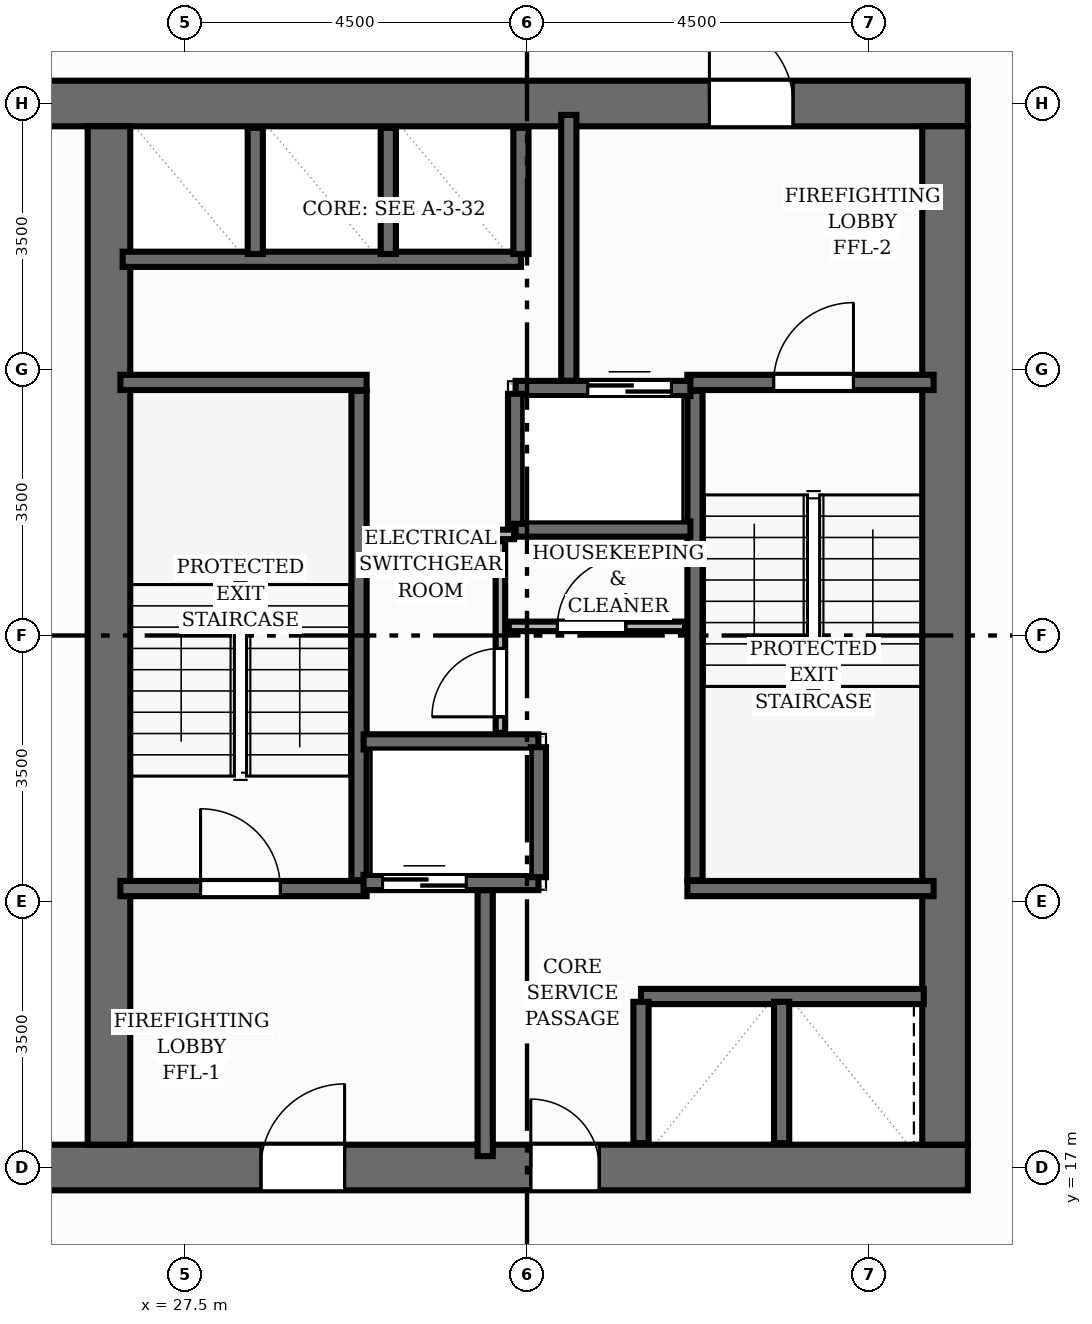
"""IFC4 building model, lengths in metres.
Left out: names, types, materials, properties, quantities, classifications, styles, units other than length and angle.
Written with IfcOpenShell. Run it as: python <this file> out.ifc"""

import sys

from ifc_helpers import new_model, si_unit, direction, frame, frame_2d, origin, place, context, subcontext, project, spatial, rectangle, extrude, element, fill, save


model = new_model("IFC4")
c1 = context("Model", 3, precision=1e-05, world=origin(), true_north=direction((0.0, 1.0)))
c2 = subcontext(c1, "Body", "Model", "MODEL_VIEW")
j1 = project(units=[si_unit("LENGTHUNIT", "METRE"), si_unit("PLANEANGLEUNIT", "RADIAN")], contexts=[c1])
p1 = place(None, origin())
s1 = spatial("IfcSite", under=j1, at=p1, CompositionType="ELEMENT")
p2 = place(p1, origin())
s2 = spatial("IfcBuilding", under=s1, at=p2, CompositionType="ELEMENT")
p3 = place(p2, frame((0.0, 0.0, 129.76)))
s3 = spatial("IfcBuildingStorey", under=s2, at=p3, CompositionType="ELEMENT", Elevation=129.76)
p4 = place(p3, frame((22.7, 17.0, 0.0), z_axis=(0.0, 0.0, 1.0), x_axis=(1.0, 0.0, 0.0)))
e1 = element("IfcWall", 1, at=p4, inside=s3, PredefinedType="SHEAR", context=c2, shape_type="SweptSolid", body=[
    extrude(rectangle(XDim=15.1, YDim=0.6, at=frame_2d((7.55, 0.0))), origin(), (0.0, 0.0, 1.0), 3.2),
])
p5 = place(p4, frame((5.8, 0.0, 0.0)))
e2 = element("IfcOpeningElement", 2, at=p5, cuts=e1, PredefinedType="OPENING", context=c2, shape_type="SweptSolid", body=[
    extrude(rectangle(XDim=1.1, YDim=2.15, at=frame_2d((0.55, 1.075))), frame((0.0, 0.31, 0.0), z_axis=(0.0, -1.0, 0.0), x_axis=(1.0, 0.0, 0.0)), (0.0, 0.0, 1.0), 0.62),
])
p6 = place(p4, frame((9.35, 0.0, 0.0)))
e3 = element("IfcOpeningElement", 3, at=p6, cuts=e1, PredefinedType="OPENING", context=c2, shape_type="SweptSolid", body=[
    extrude(rectangle(XDim=0.9, YDim=2.1, at=frame_2d((0.45, 1.05))), frame((0.0, 0.31, 0.0), z_axis=(0.0, -1.0, 0.0), x_axis=(1.0, 0.0, 0.0)), (0.0, 0.0, 1.0), 0.62),
])
p7 = place(p3, frame((22.7, 31.0, 0.0), z_axis=(0.0, 0.0, 1.0), x_axis=(1.0, 0.0, 0.0)))
e4 = element("IfcWall", 4, at=p7, inside=s3, PredefinedType="SHEAR", context=c2, shape_type="SweptSolid", body=[
    extrude(rectangle(XDim=15.1, YDim=0.6, at=frame_2d((7.55, 0.0))), origin(), (0.0, 0.0, 1.0), 3.2),
])
p8 = place(p7, frame((11.7, 0.0, 0.0)))
e5 = element("IfcOpeningElement", 5, at=p8, cuts=e4, PredefinedType="OPENING", context=c2, shape_type="SweptSolid", body=[
    extrude(rectangle(XDim=1.1, YDim=2.15, at=frame_2d((0.55, 1.075))), frame((0.0, 0.31, 0.0), z_axis=(0.0, -1.0, 0.0), x_axis=(1.0, 0.0, 0.0)), (0.0, 0.0, 1.0), 0.62),
])
p9 = place(p3, frame((37.5, 17.3, 0.0), z_axis=(0.0, 0.0, 1.0), x_axis=(0.0, 1.0, 0.0)))
e6 = element("IfcWall", 6, at=p9, inside=s3, PredefinedType="SHEAR", context=c2, shape_type="SweptSolid", body=[
    extrude(rectangle(XDim=13.4, YDim=0.6, at=frame_2d((6.7, 0.0))), origin(), (0.0, 0.0, 1.0), 3.2),
])
p10 = place(p3, frame((26.5, 17.3, 0.0), z_axis=(0.0, 0.0, 1.0), x_axis=(0.0, 1.0, 0.0)))
e7 = element("IfcWall", 7, at=p10, inside=s3, PredefinedType="SHEAR", context=c2, shape_type="SweptSolid", body=[
    extrude(rectangle(XDim=13.4, YDim=0.56, at=frame_2d((6.7, 0.0))), origin(), (0.0, 0.0, 1.0), 3.2),
])
p11 = place(p3, frame((29.79, 20.78, 0.0), z_axis=(0.0, 0.0, 1.0), x_axis=(0.0, 1.0, 0.0)))
e8 = element("IfcWall", 8, at=p11, inside=s3, PredefinedType="SHEAR", context=c2, shape_type="SweptSolid", body=[
    extrude(rectangle(XDim=6.44, YDim=0.2, at=frame_2d((3.22, 0.0))), origin(), (0.0, 0.0, 1.0), 3.2),
])
p12 = place(p3, frame((26.65, 27.33, 0.0), z_axis=(0.0, 0.0, 1.0), x_axis=(1.0, 0.0, 0.0)))
e9 = element("IfcWall", 9, at=p12, inside=s3, PredefinedType="SHEAR", context=c2, shape_type="SweptSolid", body=[
    extrude(rectangle(XDim=3.24, YDim=0.2, at=frame_2d((1.62, 0.0))), origin(), (0.0, 0.0, 1.0), 3.2),
])
p13 = place(p3, frame((26.65, 20.67, 0.0), z_axis=(0.0, 0.0, 1.0), x_axis=(1.0, 0.0, 0.0)))
e10 = element("IfcWall", 10, at=p13, inside=s3, PredefinedType="SHEAR", context=c2, shape_type="SweptSolid", body=[
    extrude(rectangle(XDim=3.24, YDim=0.2, at=frame_2d((1.62, 0.0))), origin(), (0.0, 0.0, 1.0), 3.2),
])
p14 = place(p13, frame((1.055, 0.0, 0.0)))
e11 = element("IfcOpeningElement", 11, at=p14, cuts=e10, PredefinedType="OPENING", context=c2, shape_type="SweptSolid", body=[
    extrude(rectangle(XDim=1.05, YDim=2.15, at=frame_2d((0.525, 1.075))), frame((0.0, 0.11, 0.0), z_axis=(0.0, -1.0, 0.0), x_axis=(1.0, 0.0, 0.0)), (0.0, 0.0, 1.0), 0.22),
])
p15 = place(p3, frame((34.21, 20.78, 0.0), z_axis=(0.0, 0.0, 1.0), x_axis=(0.0, 1.0, 0.0)))
e12 = element("IfcWall", 12, at=p15, inside=s3, PredefinedType="SHEAR", context=c2, shape_type="SweptSolid", body=[
    extrude(rectangle(XDim=6.44, YDim=0.2, at=frame_2d((3.22, 0.0))), origin(), (0.0, 0.0, 1.0), 3.2),
])
p16 = place(p3, frame((34.11, 20.67, 0.0), z_axis=(0.0, 0.0, 1.0), x_axis=(1.0, 0.0, 0.0)))
e13 = element("IfcWall", 13, at=p16, inside=s3, PredefinedType="SHEAR", context=c2, shape_type="SweptSolid", body=[
    extrude(rectangle(XDim=3.24, YDim=0.2, at=frame_2d((1.62, 0.0))), origin(), (0.0, 0.0, 1.0), 3.2),
])
p17 = place(p3, frame((34.11, 27.33, 0.0), z_axis=(0.0, 0.0, 1.0), x_axis=(1.0, 0.0, 0.0)))
e14 = element("IfcWall", 14, at=p17, inside=s3, PredefinedType="SHEAR", context=c2, shape_type="SweptSolid", body=[
    extrude(rectangle(XDim=3.24, YDim=0.2, at=frame_2d((1.62, 0.0))), origin(), (0.0, 0.0, 1.0), 3.2),
])
p18 = place(p17, frame((1.135, 0.0, 0.0)))
e15 = element("IfcOpeningElement", 15, at=p18, cuts=e14, PredefinedType="OPENING", context=c2, shape_type="SweptSolid", body=[
    extrude(rectangle(XDim=1.05, YDim=2.15, at=frame_2d((0.525, 1.075))), frame((0.0, 0.11, 0.0), z_axis=(0.0, -1.0, 0.0), x_axis=(1.0, 0.0, 0.0)), (0.0, 0.0, 1.0), 0.22),
])
for number, where, z_axis, x_axis in (
    (16, (31.45, 17.15, 0.0), (0.0, 0.0, 1.0), (0.0, 1.0, 0.0)),
    (17, (32.55, 27.35, 0.0), (0.0, 0.0, 1.0), (0.0, 1.0, 0.0)),
):
    element("IfcWall", number, at=place(p3, frame(where, z_axis=z_axis, x_axis=x_axis)), inside=s3, PredefinedType="SHEAR", context=c2, shape_type="SweptSolid", body=[
        extrude(rectangle(XDim=3.5, YDim=0.2, at=frame_2d((1.75, 0.0))), origin(), (0.0, 0.0, 1.0), 3.2),
    ])
p19 = place(p3, frame((29.85, 20.75, 0.0), z_axis=(0.0, 0.0, 1.0), x_axis=(1.0, 0.0, 0.0)))
e18 = element("IfcWall", 18, at=p19, inside=s3, PredefinedType="SHEAR", context=c2, shape_type="SweptSolid", body=[
    extrude(rectangle(XDim=2.3, YDim=0.2, at=frame_2d((1.15, 0.0))), origin(), (0.0, 0.0, 1.0), 3.2),
])
p20 = place(p19, frame((0.25, 0.0, 0.0)))
e19 = element("IfcOpeningElement", 19, at=p20, cuts=e18, PredefinedType="OPENING", context=c2, shape_type="SweptSolid", body=[
    extrude(rectangle(XDim=1.1, YDim=2.15, at=frame_2d((0.55, 1.075))), frame((0.0, 0.11, 0.0), z_axis=(0.0, -1.0, 0.0), x_axis=(1.0, 0.0, 0.0)), (0.0, 0.0, 1.0), 0.22),
])
p21 = place(p3, frame((29.85, 22.6, 0.0), z_axis=(0.0, 0.0, 1.0), x_axis=(1.0, 0.0, 0.0)))
e20 = element("IfcWall", 20, at=p21, inside=s3, PredefinedType="SHEAR", context=c2, shape_type="SweptSolid", body=[
    extrude(rectangle(XDim=2.3, YDim=0.2, at=frame_2d((1.15, 0.0))), origin(), (0.0, 0.0, 1.0), 3.2),
])
p22 = place(p3, frame((32.15, 20.82, 0.0), z_axis=(0.0, 0.0, 1.0), x_axis=(0.0, 1.0, 0.0)))
e21 = element("IfcWall", 21, at=p22, inside=s3, PredefinedType="SHEAR", context=c2, shape_type="SweptSolid", body=[
    extrude(rectangle(XDim=1.71, YDim=0.2, at=frame_2d((0.855, 0.0))), origin(), (0.0, 0.0, 1.0), 3.2),
])
p23 = place(p3, frame((31.85, 27.25, 0.0), z_axis=(0.0, 0.0, 1.0), x_axis=(1.0, 0.0, 0.0)))
e22 = element("IfcWall", 22, at=p23, inside=s3, PredefinedType="SHEAR", context=c2, shape_type="SweptSolid", body=[
    extrude(rectangle(XDim=2.3, YDim=0.2, at=frame_2d((1.15, 0.0))), origin(), (0.0, 0.0, 1.0), 3.2),
])
p24 = place(p23, frame((0.95, 0.0, 0.0)))
e23 = element("IfcOpeningElement", 23, at=p24, cuts=e22, PredefinedType="OPENING", context=c2, shape_type="SweptSolid", body=[
    extrude(rectangle(XDim=1.1, YDim=2.15, at=frame_2d((0.55, 1.075))), frame((0.0, 0.11, 0.0), z_axis=(0.0, -1.0, 0.0), x_axis=(1.0, 0.0, 0.0)), (0.0, 0.0, 1.0), 0.22),
])
p25 = place(p3, frame((31.85, 25.4, 0.0), z_axis=(0.0, 0.0, 1.0), x_axis=(1.0, 0.0, 0.0)))
e24 = element("IfcWall", 24, at=p25, inside=s3, PredefinedType="SHEAR", context=c2, shape_type="SweptSolid", body=[
    extrude(rectangle(XDim=2.3, YDim=0.2, at=frame_2d((1.15, 0.0))), origin(), (0.0, 0.0, 1.0), 3.2),
])
p26 = place(p3, frame((31.85, 25.47, 0.0), z_axis=(0.0, 0.0, 1.0), x_axis=(0.0, 1.0, 0.0)))
e25 = element("IfcWall", 25, at=p26, inside=s3, PredefinedType="SHEAR", context=c2, shape_type="SweptSolid", body=[
    extrude(rectangle(XDim=1.71, YDim=0.2, at=frame_2d((0.855, 0.0))), origin(), (0.0, 0.0, 1.0), 3.2),
])
p27 = place(p3, frame((26.68, 28.95, 0.0), z_axis=(0.0, 0.0, 1.0), x_axis=(1.0, 0.0, 0.0)))
e26 = element("IfcWall", 26, at=p27, inside=s3, PredefinedType="SHEAR", context=c2, shape_type="SweptSolid", body=[
    extrude(rectangle(XDim=5.24, YDim=0.2, at=frame_2d((2.62, 0.0))), origin(), (0.0, 0.0, 1.0), 3.2),
])
for number, where, z_axis, x_axis in (
    (27, (31.92, 29.02, 0.0), (0.0, 0.0, 1.0), (0.0, 1.0, 0.0)),
    (28, (28.425, 29.02, 0.0), (0.0, 0.0, 1.0), (0.0, 1.0, 0.0)),
    (29, (30.175, 29.02, 0.0), (0.0, 0.0, 1.0), (0.0, 1.0, 0.0)),
):
    element("IfcWall", number, at=place(p3, frame(where, z_axis=z_axis, x_axis=x_axis)), inside=s3, PredefinedType="SHEAR", context=c2, shape_type="SweptSolid", body=[
        extrude(rectangle(XDim=1.66, YDim=0.2, at=frame_2d((0.83, 0.0))), origin(), (0.0, 0.0, 1.0), 3.2),
    ])
p28 = place(p3, frame((33.5, 19.25, 0.0), z_axis=(0.0, 0.0, 1.0), x_axis=(1.0, 0.0, 0.0)))
e30 = element("IfcWall", 30, at=p28, inside=s3, PredefinedType="SHEAR", context=c2, shape_type="SweptSolid", body=[
    extrude(rectangle(XDim=3.72, YDim=0.2, at=frame_2d((1.86, 0.0))), origin(), (0.0, 0.0, 1.0), 3.2),
])
for number, where, z_axis, x_axis in (
    (31, (33.5, 17.32, 0.0), (0.0, 0.0, 1.0), (0.0, 1.0, 0.0)),
    (32, (35.35, 17.32, 0.0), (0.0, 0.0, 1.0), (0.0, 1.0, 0.0)),
):
    element("IfcWall", number, at=place(p3, frame(where, z_axis=z_axis, x_axis=x_axis)), inside=s3, PredefinedType="SHEAR", context=c2, shape_type="SweptSolid", body=[
        extrude(rectangle(XDim=1.86, YDim=0.2, at=frame_2d((0.93, 0.0))), origin(), (0.0, 0.0, 1.0), 3.2),
    ])
p29 = place(p3, frame((31.65, 22.72, 0.0), z_axis=(0.0, 0.0, 1.0), x_axis=(0.0, 1.0, 0.0)))
e33 = element("IfcWall", 33, at=p29, inside=s3, PredefinedType="PARTITIONING", context=c2, shape_type="SweptSolid", body=[
    extrude(rectangle(XDim=2.52, YDim=0.125, at=frame_2d((1.26, 0.0))), origin(), (0.0, 0.0, 1.0), 2.955),
])
p30 = place(p29, frame((0.21, 0.0, 0.0)))
e34 = element("IfcOpeningElement", 34, at=p30, cuts=e33, PredefinedType="OPENING", context=c2, shape_type="SweptSolid", body=[
    extrude(rectangle(XDim=0.9, YDim=2.1, at=frame_2d((0.45, 1.05))), frame((0.0, 0.073, 0.0), z_axis=(0.0, -1.0, 0.0), x_axis=(1.0, 0.0, 0.0)), (0.0, 0.0, 1.0), 0.145),
])
p31 = place(p3, frame((31.76, 24.12, 0.0), z_axis=(0.0, 0.0, 1.0), x_axis=(1.0, 0.0, 0.0)))
e35 = element("IfcWall", 35, at=p31, inside=s3, PredefinedType="PARTITIONING", context=c2, shape_type="SweptSolid", body=[
    extrude(rectangle(XDim=2.32, YDim=0.125, at=frame_2d((1.16, 0.0))), origin(), (0.0, 0.0, 1.0), 2.955),
])
p32 = place(p31, frame((0.64, 0.0, 0.0)))
e36 = element("IfcOpeningElement", 36, at=p32, cuts=e35, PredefinedType="OPENING", context=c2, shape_type="SweptSolid", body=[
    extrude(rectangle(XDim=0.9, YDim=2.1, at=frame_2d((0.45, 1.05))), frame((0.0, 0.073, 0.0), z_axis=(0.0, -1.0, 0.0), x_axis=(1.0, 0.0, 0.0)), (0.0, 0.0, 1.0), 0.145),
])
p33 = place(p3, frame((29.89, 25.33, 0.0), z_axis=(0.0, 0.0, 1.0), x_axis=(1.0, 0.0, 0.0)))
e37 = element("IfcWall", 37, at=p33, inside=s3, PredefinedType="PARTITIONING", context=c2, shape_type="SweptSolid", body=[
    extrude(rectangle(XDim=1.94, YDim=0.125, at=frame_2d((0.97, 0.0))), origin(), (0.0, 0.0, 1.0), 2.955),
])
p34 = place(p14, origin())
e38 = element("IfcDoor", 38, at=p34, inside=s3, OperationType="SINGLE_SWING_LEFT", PredefinedType="DOOR", context=c2, shape_type="SweptSolid", body=[
    extrude(rectangle(XDim=1.05, YDim=2.15, at=frame_2d((0.525, 1.075))), frame((0.0, 0.025, 0.0), z_axis=(0.0, -1.0, 0.0), x_axis=(1.0, 0.0, 0.0)), (0.0, 0.0, 1.0), 0.05),
])
fill(e11, e38)
p35 = place(p18, origin())
e39 = element("IfcDoor", 39, at=p35, inside=s3, OperationType="SINGLE_SWING_RIGHT", PredefinedType="DOOR", context=c2, shape_type="SweptSolid", body=[
    extrude(rectangle(XDim=1.05, YDim=2.15, at=frame_2d((0.525, 1.075))), frame((0.0, 0.025, 0.0), z_axis=(0.0, -1.0, 0.0), x_axis=(1.0, 0.0, 0.0)), (0.0, 0.0, 1.0), 0.05),
])
fill(e15, e39)
p36 = place(p5, origin())
e40 = element("IfcDoor", 40, at=p36, inside=s3, OperationType="SINGLE_SWING_RIGHT", PredefinedType="DOOR", context=c2, shape_type="SweptSolid", body=[
    extrude(rectangle(XDim=1.1, YDim=2.15, at=frame_2d((0.55, 1.075))), frame((0.0, 0.025, 0.0), z_axis=(0.0, -1.0, 0.0), x_axis=(1.0, 0.0, 0.0)), (0.0, 0.0, 1.0), 0.05),
])
fill(e2, e40)
p37 = place(p8, origin())
e41 = element("IfcDoor", 41, at=p37, inside=s3, OperationType="SINGLE_SWING_LEFT", PredefinedType="DOOR", context=c2, shape_type="SweptSolid", body=[
    extrude(rectangle(XDim=1.1, YDim=2.15, at=frame_2d((0.55, 1.075))), frame((0.0, 0.025, 0.0), z_axis=(0.0, -1.0, 0.0), x_axis=(1.0, 0.0, 0.0)), (0.0, 0.0, 1.0), 0.05),
])
fill(e5, e41)
p38 = place(p20, origin())
e42 = element("IfcDoor", 42, at=p38, inside=s3, OperationType="DOUBLE_DOOR_SLIDING", PredefinedType="DOOR", context=c2, shape_type="SweptSolid", body=[
    extrude(rectangle(XDim=1.1, YDim=2.15, at=frame_2d((0.55, 1.075))), frame((0.0, 0.025, 0.0), z_axis=(0.0, -1.0, 0.0), x_axis=(1.0, 0.0, 0.0)), (0.0, 0.0, 1.0), 0.05),
])
fill(e19, e42)
p39 = place(p24, origin())
e43 = element("IfcDoor", 43, at=p39, inside=s3, OperationType="DOUBLE_DOOR_SLIDING", PredefinedType="DOOR", context=c2, shape_type="SweptSolid", body=[
    extrude(rectangle(XDim=1.1, YDim=2.15, at=frame_2d((0.55, 1.075))), frame((0.0, 0.025, 0.0), z_axis=(0.0, -1.0, 0.0), x_axis=(1.0, 0.0, 0.0)), (0.0, 0.0, 1.0), 0.05),
])
fill(e23, e43)
p40 = place(p6, origin())
e44 = element("IfcDoor", 44, at=p40, inside=s3, OperationType="SINGLE_SWING_LEFT", PredefinedType="DOOR", context=c2, shape_type="SweptSolid", body=[
    extrude(rectangle(XDim=0.9, YDim=2.1, at=frame_2d((0.45, 1.05))), frame((0.0, 0.025, 0.0), z_axis=(0.0, -1.0, 0.0), x_axis=(1.0, 0.0, 0.0)), (0.0, 0.0, 1.0), 0.05),
])
fill(e3, e44)
p41 = place(p30, origin())
e45 = element("IfcDoor", 45, at=p41, inside=s3, OperationType="SINGLE_SWING_LEFT", PredefinedType="DOOR", context=c2, shape_type="SweptSolid", body=[
    extrude(rectangle(XDim=0.9, YDim=2.1, at=frame_2d((0.45, 1.05))), frame((0.0, 0.025, 0.0), z_axis=(0.0, -1.0, 0.0), x_axis=(1.0, 0.0, 0.0)), (0.0, 0.0, 1.0), 0.05),
])
fill(e34, e45)
p42 = place(p32, origin())
e46 = element("IfcDoor", 46, at=p42, inside=s3, OperationType="SINGLE_SWING_RIGHT", PredefinedType="DOOR", context=c2, shape_type="SweptSolid", body=[
    extrude(rectangle(XDim=0.9, YDim=2.1, at=frame_2d((0.45, 1.05))), frame((0.0, 0.025, 0.0), z_axis=(0.0, -1.0, 0.0), x_axis=(1.0, 0.0, 0.0)), (0.0, 0.0, 1.0), 0.05),
])
fill(e36, e46)
save(model, sys.argv[1])
